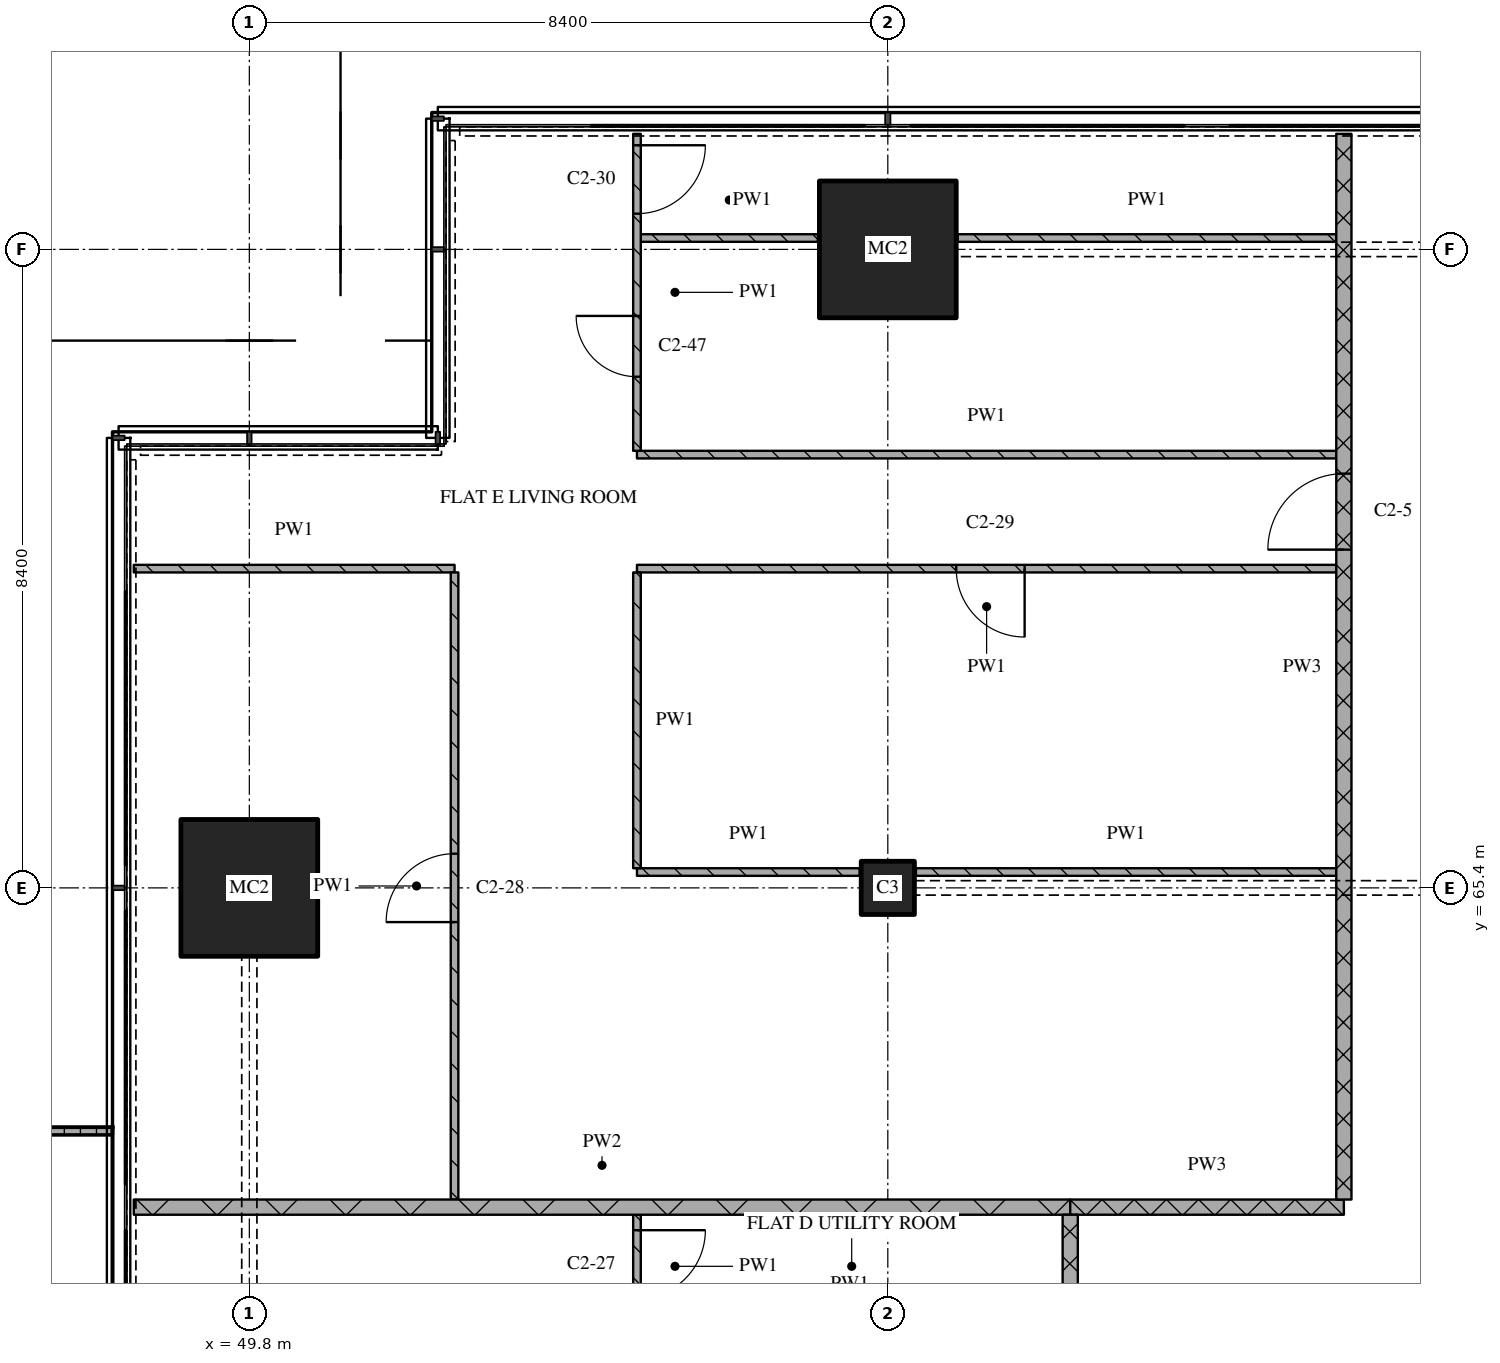
"""IFC4 building model, lengths in metres.
Left out: names, types, materials, properties, quantities, classifications, styles, units other than length and angle.
Written with IfcOpenShell. Run it as: python <this file> out.ifc"""

import sys

from ifc_helpers import new_model, si_unit, direction, frame, frame_2d, origin, origin_2d, place, context, subcontext, project, spatial, polyline, rectangle, outline, extrude, element, fill, save


model = new_model("IFC4")
c1 = context("Model", 3, precision=1e-05, world=origin(), true_north=direction((0.0, 1.0)))
c2 = subcontext(c1, "Body", "Model", "MODEL_VIEW")
j1 = project(units=[si_unit("LENGTHUNIT", "METRE"), si_unit("PLANEANGLEUNIT", "RADIAN")], contexts=[c1])
p1 = place(None, origin())
s1 = spatial("IfcSite", under=j1, at=p1, CompositionType="ELEMENT")
p2 = place(p1, origin())
s2 = spatial("IfcBuilding", under=s1, at=p2, CompositionType="ELEMENT")
p3 = place(p2, frame((0.0, 0.0, 158.25)))
s3 = spatial("IfcBuildingStorey", under=s2, at=p3, CompositionType="ELEMENT", Elevation=158.25)
p4 = place(p3, frame((49.8, 65.4, 0.0), z_axis=(0.0, 0.0, 1.0), x_axis=(1.0, 0.0, 0.0)))
e1 = element("IfcColumn", 1, at=p4, inside=s3, PredefinedType="COLUMN", context=c2, shape_type="SweptSolid", body=[
    extrude(rectangle(XDim=1.8, YDim=1.8, at=origin_2d()), origin(), (0.0, 0.0, 1.0), 3.6),
])
p5 = place(p3, frame((58.2, 65.4, 0.0), z_axis=(0.0, 0.0, 1.0), x_axis=(1.0, 0.0, 0.0)))
e2 = element("IfcColumn", 2, at=p5, inside=s3, PredefinedType="COLUMN", context=c2, shape_type="SweptSolid", body=[
    extrude(rectangle(XDim=0.7, YDim=0.7, at=origin_2d()), origin(), (0.0, 0.0, 1.0), 3.6),
])
p6 = place(p3, frame((58.2, 73.8, 0.0), z_axis=(0.0, 0.0, 1.0), x_axis=(1.0, 0.0, 0.0)))
e3 = element("IfcColumn", 3, at=p6, inside=s3, PredefinedType="COLUMN", context=c2, shape_type="SweptSolid", body=[
    extrude(rectangle(XDim=1.8, YDim=1.8, at=origin_2d()), origin(), (0.0, 0.0, 1.0), 3.6),
])
p7 = place(p3, origin())
e4 = element("IfcWall", 4, at=p7, inside=s3, PredefinedType="SOLIDWALL", context=c2, shape_type="SweptSolid", body=[
    extrude(outline(polyline([(48.0, 62.25), (48.0, 62.15), (46.233, 62.15), (46.233, 56.05), (48.0, 56.05), (48.0, 55.95), (46.133, 55.95), (46.133, 62.25), (48.0, 62.25)])), origin(), (0.0, 0.0, 1.0), 1.0),
])
p8 = place(p3, frame((60.6, 61.2, 0.0), z_axis=(0.0, 0.0, 1.0), x_axis=(1.0, 0.0, 0.0)))
e5 = element("IfcWall", 5, at=p8, inside=s3, PredefinedType="PARTITIONING", context=c2, shape_type="SweptSolid", body=[
    extrude(rectangle(XDim=3.6, YDim=0.2, at=frame_2d((1.8, 0.0))), origin(), (0.0, 0.0, 1.0), 3.32),
])
p9 = place(p3, frame((48.28, 61.2, 0.0), z_axis=(0.0, 0.0, 1.0), x_axis=(1.0, 0.0, 0.0)))
e6 = element("IfcWall", 6, at=p9, inside=s3, PredefinedType="PARTITIONING", context=c2, shape_type="SweptSolid", body=[
    extrude(rectangle(XDim=12.32, YDim=0.2, at=frame_2d((6.16, 0.0))), origin(), (0.0, 0.0, 1.0), 3.32),
])
p10 = place(p3, frame((54.9, 65.609, 0.0), z_axis=(0.0, 0.0, 1.0), x_axis=(1.0, 0.0, 0.0)))
e7 = element("IfcWall", 7, at=p10, inside=s3, PredefinedType="PARTITIONING", context=c2, shape_type="SweptSolid", body=[
    extrude(rectangle(XDim=2.93, YDim=0.1, at=frame_2d((1.465, 0.0))), origin(), (0.0, 0.0, 1.0), 3.32),
])
p11 = place(p3, frame((58.57, 65.609, 0.0), z_axis=(0.0, 0.0, 1.0), x_axis=(1.0, 0.0, 0.0)))
e8 = element("IfcWall", 8, at=p11, inside=s3, PredefinedType="PARTITIONING", context=c2, shape_type="SweptSolid", body=[
    extrude(rectangle(XDim=5.53, YDim=0.1, at=frame_2d((2.765, 0.0))), origin(), (0.0, 0.0, 1.0), 3.32),
])
p12 = place(p3, frame((48.28, 69.6, 0.0), z_axis=(0.0, 0.0, 1.0), x_axis=(1.0, 0.0, 0.0)))
e9 = element("IfcWall", 9, at=p12, inside=s3, PredefinedType="PARTITIONING", context=c2, shape_type="SweptSolid", body=[
    extrude(rectangle(XDim=4.22, YDim=0.1, at=frame_2d((2.11, 0.0))), origin(), (0.0, 0.0, 1.0), 3.32),
])
p13 = place(p3, frame((64.1, 69.6, 0.0), z_axis=(0.0, 0.0, 1.0), x_axis=(-1.0, 0.0, 0.0)))
e10 = element("IfcWall", 10, at=p13, inside=s3, PredefinedType="PARTITIONING", context=c2, shape_type="SweptSolid", body=[
    extrude(rectangle(XDim=9.2, YDim=0.1, at=frame_2d((4.6, 0.0))), origin(), (0.0, 0.0, 1.0), 3.32),
])
p14 = place(p13, frame((4.1, 0.0, 0.0)))
e11 = element("IfcOpeningElement", 11, at=p14, cuts=e10, PredefinedType="OPENING", context=c2, shape_type="SweptSolid", body=[
    extrude(rectangle(XDim=0.9, YDim=2.1, at=frame_2d((0.45, 1.05))), frame((0.0, 0.06, 0.0), z_axis=(0.0, -1.0, 0.0), x_axis=(1.0, 0.0, 0.0)), (0.0, 0.0, 1.0), 0.12),
])
p15 = place(p3, frame((54.9, 71.1, 0.0), z_axis=(0.0, 0.0, 1.0), x_axis=(1.0, 0.0, 0.0)))
e12 = element("IfcWall", 12, at=p15, inside=s3, PredefinedType="PARTITIONING", context=c2, shape_type="SweptSolid", body=[
    extrude(rectangle(XDim=9.2, YDim=0.1, at=frame_2d((4.6, 0.0))), origin(), (0.0, 0.0, 1.0), 3.32),
])
p16 = place(p3, frame((54.95, 73.949, 0.0), z_axis=(0.0, 0.0, 1.0), x_axis=(1.0, 0.0, 0.0)))
e13 = element("IfcWall", 13, at=p16, inside=s3, PredefinedType="PARTITIONING", context=c2, shape_type="SweptSolid", body=[
    extrude(rectangle(XDim=2.33, YDim=0.1, at=frame_2d((1.165, 0.0))), origin(), (0.0, 0.0, 1.0), 3.32),
])
p17 = place(p3, frame((59.12, 73.949, 0.0), z_axis=(0.0, 0.0, 1.0), x_axis=(1.0, 0.0, 0.0)))
e14 = element("IfcWall", 14, at=p17, inside=s3, PredefinedType="PARTITIONING", context=c2, shape_type="SweptSolid", body=[
    extrude(rectangle(XDim=4.98, YDim=0.1, at=frame_2d((2.49, 0.0))), origin(), (0.0, 0.0, 1.0), 3.32),
])
p18 = place(p3, frame((52.5, 61.3, 0.0), z_axis=(0.0, 0.0, 1.0), x_axis=(0.0, 1.0, 0.0)))
e15 = element("IfcWall", 15, at=p18, inside=s3, PredefinedType="PARTITIONING", context=c2, shape_type="SweptSolid", body=[
    extrude(rectangle(XDim=8.25, YDim=0.1, at=frame_2d((4.125, 0.0))), origin(), (0.0, 0.0, 1.0), 3.32),
])
p19 = place(p18, frame((3.65, 0.0, 0.0)))
e16 = element("IfcOpeningElement", 16, at=p19, cuts=e15, PredefinedType="OPENING", context=c2, shape_type="SweptSolid", body=[
    extrude(rectangle(XDim=0.9, YDim=2.1, at=frame_2d((0.45, 1.05))), frame((0.0, 0.06, 0.0), z_axis=(0.0, -1.0, 0.0), x_axis=(1.0, 0.0, 0.0)), (0.0, 0.0, 1.0), 0.12),
])
p20 = place(p3, frame((54.9, 61.1, 0.0), z_axis=(0.0, 0.0, 1.0), x_axis=(0.0, -1.0, 0.0)))
e17 = element("IfcWall", 17, at=p20, inside=s3, PredefinedType="PARTITIONING", context=c2, shape_type="SweptSolid", body=[
    extrude(rectangle(XDim=1.357, YDim=0.1, at=frame_2d((0.679, 0.0))), origin(), (0.0, 0.0, 1.0), 3.32),
])
p21 = place(p20, frame((0.204, 0.0, 0.0)))
e18 = element("IfcOpeningElement", 18, at=p21, cuts=e17, PredefinedType="OPENING", context=c2, shape_type="SweptSolid", body=[
    extrude(rectangle(XDim=0.9, YDim=2.1, at=frame_2d((0.45, 1.05))), frame((0.0, 0.06, 0.0), z_axis=(0.0, -1.0, 0.0), x_axis=(1.0, 0.0, 0.0)), (0.0, 0.0, 1.0), 0.12),
])
p22 = place(p3, frame((54.9, 69.55, 0.0), z_axis=(0.0, 0.0, 1.0), x_axis=(0.0, -1.0, 0.0)))
e19 = element("IfcWall", 19, at=p22, inside=s3, PredefinedType="PARTITIONING", context=c2, shape_type="SweptSolid", body=[
    extrude(rectangle(XDim=3.891, YDim=0.1, at=frame_2d((1.946, 0.0))), origin(), (0.0, 0.0, 1.0), 3.32),
])
p23 = place(p3, frame((54.9, 75.32, 0.0), z_axis=(0.0, 0.0, 1.0), x_axis=(0.0, -1.0, 0.0)))
e20 = element("IfcWall", 20, at=p23, inside=s3, PredefinedType="PARTITIONING", context=c2, shape_type="SweptSolid", body=[
    extrude(rectangle(XDim=4.17, YDim=0.1, at=frame_2d((2.085, 0.0))), origin(), (0.0, 0.0, 1.0), 3.32),
])
p24 = place(p23, frame((0.15, 0.0, 0.0)))
e21 = element("IfcOpeningElement", 21, at=p24, cuts=e20, PredefinedType="OPENING", context=c2, shape_type="SweptSolid", body=[
    extrude(rectangle(XDim=0.9, YDim=2.1, at=frame_2d((0.45, 1.05))), frame((0.0, 0.06, 0.0), z_axis=(0.0, -1.0, 0.0), x_axis=(1.0, 0.0, 0.0)), (0.0, 0.0, 1.0), 0.12),
])
p25 = place(p23, frame((2.395, 0.0, 0.0)))
e22 = element("IfcOpeningElement", 22, at=p25, cuts=e20, PredefinedType="OPENING", context=c2, shape_type="SweptSolid", body=[
    extrude(rectangle(XDim=0.8, YDim=2.1, at=frame_2d((0.4, 1.05))), frame((0.0, 0.06, 0.0), z_axis=(0.0, -1.0, 0.0), x_axis=(1.0, 0.0, 0.0)), (0.0, 0.0, 1.0), 0.12),
])
p26 = place(p3, frame((60.6, 43.3, 0.0), z_axis=(0.0, 0.0, 1.0), x_axis=(0.0, 1.0, 0.0)))
e23 = element("IfcWall", 23, at=p26, inside=s3, PredefinedType="PARTITIONING", context=c2, shape_type="SweptSolid", body=[
    extrude(rectangle(XDim=17.8, YDim=0.2, at=frame_2d((8.9, 0.0))), origin(), (0.0, 0.0, 1.0), 3.32),
])
p27 = place(p26, frame((7.95, 0.0, 0.0)))
e24 = element("IfcOpeningElement", 24, at=p27, cuts=e23, PredefinedType="OPENING", context=c2, shape_type="SweptSolid", body=[
    extrude(rectangle(XDim=1.0, YDim=2.1, at=frame_2d((0.5, 1.05))), frame((0.0, 0.11, 0.0), z_axis=(0.0, -1.0, 0.0), x_axis=(1.0, 0.0, 0.0)), (0.0, 0.0, 1.0), 0.22),
])
p28 = place(p3, frame((64.2, 61.3, 0.0), z_axis=(0.0, 0.0, 1.0), x_axis=(0.0, 1.0, 0.0)))
e25 = element("IfcWall", 25, at=p28, inside=s3, PredefinedType="PARTITIONING", context=c2, shape_type="SweptSolid", body=[
    extrude(rectangle(XDim=14.02, YDim=0.2, at=frame_2d((7.01, 0.0))), origin(), (0.0, 0.0, 1.0), 3.32),
])
p29 = place(p28, frame((8.55, 0.0, 0.0)))
e26 = element("IfcOpeningElement", 26, at=p29, cuts=e25, PredefinedType="OPENING", context=c2, shape_type="SweptSolid", body=[
    extrude(rectangle(XDim=1.0, YDim=2.1, at=frame_2d((0.5, 1.05))), frame((0.0, 0.11, 0.0), z_axis=(0.0, -1.0, 0.0), x_axis=(1.0, 0.0, 0.0)), (0.0, 0.0, 1.0), 0.22),
])
p30 = place(p14, origin())
e27 = element("IfcDoor", 27, at=p30, inside=s3, OperationType="SINGLE_SWING_LEFT", PredefinedType="DOOR", context=c2, shape_type="SweptSolid", body=[
    extrude(rectangle(XDim=0.9, YDim=2.1, at=frame_2d((0.45, 1.05))), frame((0.0, 0.025, 0.0), z_axis=(0.0, -1.0, 0.0), x_axis=(1.0, 0.0, 0.0)), (0.0, 0.0, 1.0), 0.05),
])
fill(e11, e27)
p31 = place(p19, origin())
e28 = element("IfcDoor", 28, at=p31, inside=s3, OperationType="SINGLE_SWING_LEFT", PredefinedType="DOOR", context=c2, shape_type="SweptSolid", body=[
    extrude(rectangle(XDim=0.9, YDim=2.1, at=frame_2d((0.45, 1.05))), frame((0.0, 0.025, 0.0), z_axis=(0.0, -1.0, 0.0), x_axis=(1.0, 0.0, 0.0)), (0.0, 0.0, 1.0), 0.05),
])
fill(e16, e28)
p32 = place(p21, origin())
e29 = element("IfcDoor", 29, at=p32, inside=s3, OperationType="SINGLE_SWING_LEFT", PredefinedType="DOOR", context=c2, shape_type="SweptSolid", body=[
    extrude(rectangle(XDim=0.9, YDim=2.1, at=frame_2d((0.45, 1.05))), frame((0.0, 0.025, 0.0), z_axis=(0.0, -1.0, 0.0), x_axis=(1.0, 0.0, 0.0)), (0.0, 0.0, 1.0), 0.05),
])
fill(e18, e29)
p33 = place(p24, origin())
e30 = element("IfcDoor", 30, at=p33, inside=s3, OperationType="SINGLE_SWING_LEFT", PredefinedType="DOOR", context=c2, shape_type="SweptSolid", body=[
    extrude(rectangle(XDim=0.9, YDim=2.1, at=frame_2d((0.45, 1.05))), frame((0.0, 0.025, 0.0), z_axis=(0.0, -1.0, 0.0), x_axis=(1.0, 0.0, 0.0)), (0.0, 0.0, 1.0), 0.05),
])
fill(e21, e30)
p34 = place(p25, origin())
e31 = element("IfcDoor", 31, at=p34, inside=s3, OperationType="SINGLE_SWING_RIGHT", PredefinedType="DOOR", context=c2, shape_type="SweptSolid", body=[
    extrude(rectangle(XDim=0.8, YDim=2.1, at=frame_2d((0.4, 1.05))), frame((0.0, 0.025, 0.0), z_axis=(0.0, -1.0, 0.0), x_axis=(1.0, 0.0, 0.0)), (0.0, 0.0, 1.0), 0.05),
])
fill(e22, e31)
p35 = place(p29, origin())
e32 = element("IfcDoor", 32, at=p35, inside=s3, OperationType="SINGLE_SWING_LEFT", PredefinedType="DOOR", context=c2, shape_type="SweptSolid", body=[
    extrude(rectangle(XDim=1.0, YDim=2.1, at=frame_2d((0.5, 1.05))), frame((0.0, 0.025, 0.0), z_axis=(0.0, -1.0, 0.0), x_axis=(1.0, 0.0, 0.0)), (0.0, 0.0, 1.0), 0.05),
])
fill(e26, e32)
save(model, sys.argv[1])
